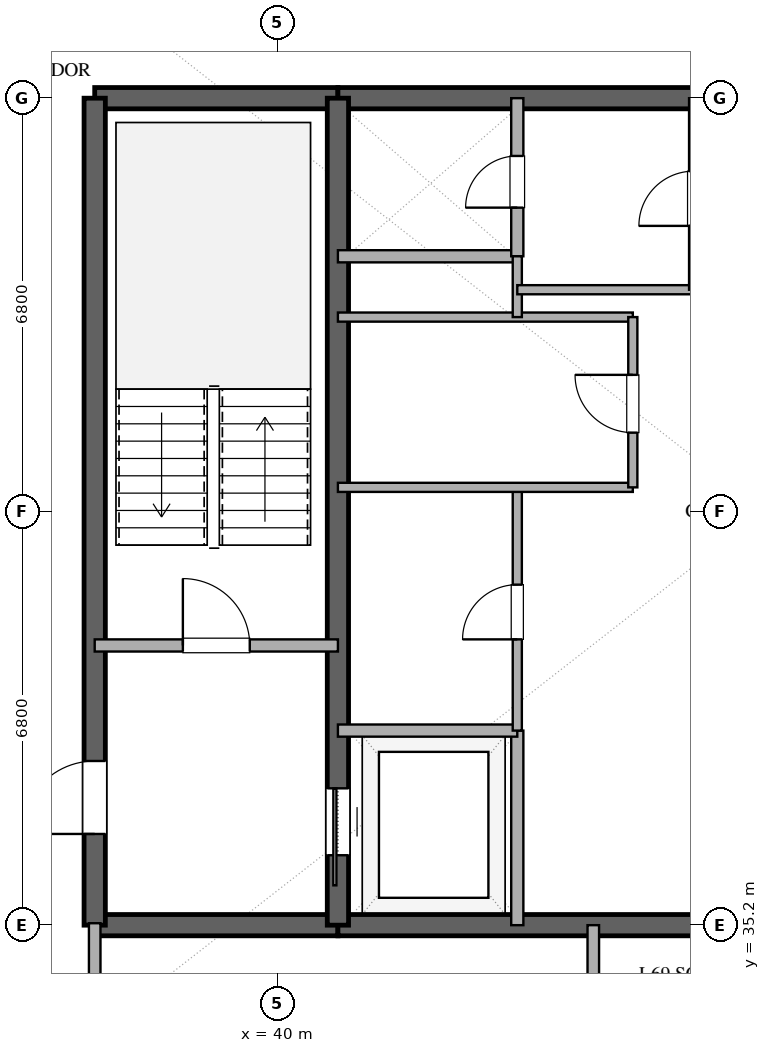
"""IFC4 building model, lengths in metres.
Left out: names, types, materials, properties, quantities, classifications, styles, units other than length and angle.
Written with IfcOpenShell. Run it as: python <this file> out.ifc"""

import sys

from ifc_helpers import new_model, si_unit, direction, frame, frame_2d, origin, place, context, subcontext, project, spatial, rectangle, extrude, element, fill, save


model = new_model("IFC4")
c1 = context("Model", 3, precision=1e-05, world=origin(), true_north=direction((0.0, 1.0)))
c2 = subcontext(c1, "Body", "Model", "MODEL_VIEW")
j1 = project(units=[si_unit("LENGTHUNIT", "METRE"), si_unit("PLANEANGLEUNIT", "RADIAN")], contexts=[c1])
p1 = place(None, origin())
s1 = spatial("IfcSite", under=j1, at=p1, CompositionType="ELEMENT")
p2 = place(p1, origin())
s2 = spatial("IfcBuilding", under=s1, at=p2, CompositionType="ELEMENT")
p3 = place(p2, frame((0.0, 0.0, 269.4)))
s3 = spatial("IfcBuildingStorey", under=s2, at=p3, CompositionType="ELEMENT", Elevation=269.4)
p4 = place(p3, frame((37.0, 35.2, 0.0), z_axis=(0.0, 0.0, 1.0), x_axis=(1.0, 0.0, 0.0)))
e1 = element("IfcWall", 1, at=p4, inside=s3, PredefinedType="SHEAR", context=c2, shape_type="SweptSolid", body=[
    extrude(rectangle(XDim=4.0, YDim=0.35, at=frame_2d((2.0, 0.0))), origin(), (0.0, 0.0, 1.0), 3.37),
])
p5 = place(p3, frame((41.0, 35.2, 0.0), z_axis=(0.0, 0.0, 1.0), x_axis=(1.0, 0.0, 0.0)))
e2 = element("IfcWall", 2, at=p5, inside=s3, PredefinedType="SHEAR", context=c2, shape_type="SweptSolid", body=[
    extrude(rectangle(XDim=14.0, YDim=0.35, at=frame_2d((7.0, 0.0))), origin(), (0.0, 0.0, 1.0), 3.37),
])
p6 = place(p5, frame((6.1, 0.0, 0.0)))
e3 = element("IfcOpeningElement", 3, at=p6, cuts=e2, PredefinedType="OPENING", context=c2, shape_type="SweptSolid", body=[
    extrude(rectangle(XDim=1.8, YDim=2.25, at=frame_2d((0.9, 1.125))), frame((0.0, 0.185, 0.0), z_axis=(0.0, -1.0, 0.0), x_axis=(1.0, 0.0, 0.0)), (0.0, 0.0, 1.0), 0.37),
])
p7 = place(p3, frame((37.0, 48.8, 0.0), z_axis=(0.0, 0.0, 1.0), x_axis=(1.0, 0.0, 0.0)))
e4 = element("IfcWall", 4, at=p7, inside=s3, PredefinedType="SHEAR", context=c2, shape_type="SweptSolid", body=[
    extrude(rectangle(XDim=4.0, YDim=0.35, at=frame_2d((2.0, 0.0))), origin(), (0.0, 0.0, 1.0), 3.37),
])
p8 = place(p3, frame((41.0, 48.8, 0.0), z_axis=(0.0, 0.0, 1.0), x_axis=(1.0, 0.0, 0.0)))
e5 = element("IfcWall", 5, at=p8, inside=s3, PredefinedType="SHEAR", context=c2, shape_type="SweptSolid", body=[
    extrude(rectangle(XDim=14.0, YDim=0.35, at=frame_2d((7.0, 0.0))), origin(), (0.0, 0.0, 1.0), 3.37),
])
p9 = place(p8, frame((6.1, 0.0, 0.0)))
e6 = element("IfcOpeningElement", 6, at=p9, cuts=e5, PredefinedType="OPENING", context=c2, shape_type="SweptSolid", body=[
    extrude(rectangle(XDim=1.8, YDim=2.25, at=frame_2d((0.9, 1.125))), frame((0.0, 0.185, 0.0), z_axis=(0.0, -1.0, 0.0), x_axis=(1.0, 0.0, 0.0)), (0.0, 0.0, 1.0), 0.37),
])
p10 = place(p3, frame((37.0, 35.2, 0.0), z_axis=(0.0, 0.0, 1.0), x_axis=(0.0, 1.0, 0.0)))
e7 = element("IfcWall", 7, at=p10, inside=s3, PredefinedType="SHEAR", context=c2, shape_type="SweptSolid", body=[
    extrude(rectangle(XDim=13.6, YDim=0.35, at=frame_2d((6.8, 0.0))), origin(), (0.0, 0.0, 1.0), 3.37),
])
p11 = place(p10, frame((1.5, 0.0, 0.0)))
e8 = element("IfcOpeningElement", 8, at=p11, cuts=e7, PredefinedType="OPENING", context=c2, shape_type="SweptSolid", body=[
    extrude(rectangle(XDim=1.2, YDim=2.15, at=frame_2d((0.6, 1.075))), frame((0.0, 0.185, 0.0), z_axis=(0.0, -1.0, 0.0), x_axis=(1.0, 0.0, 0.0)), (0.0, 0.0, 1.0), 0.37),
])
p12 = place(p3, frame((41.0, 35.2, 0.0), z_axis=(0.0, 0.0, 1.0), x_axis=(0.0, 1.0, 0.0)))
e9 = element("IfcWall", 9, at=p12, inside=s3, PredefinedType="SHEAR", context=c2, shape_type="SweptSolid", body=[
    extrude(rectangle(XDim=13.6, YDim=0.35, at=frame_2d((6.8, 0.0))), origin(), (0.0, 0.0, 1.0), 3.37),
])
p13 = place(p12, frame((1.15, 0.0, 0.0)))
e10 = element("IfcOpeningElement", 10, at=p13, cuts=e9, PredefinedType="OPENING", context=c2, shape_type="SweptSolid", body=[
    extrude(rectangle(XDim=1.1, YDim=2.2, at=frame_2d((0.55, 1.1))), frame((0.0, 0.185, 0.0), z_axis=(0.0, -1.0, 0.0), x_axis=(1.0, 0.0, 0.0)), (0.0, 0.0, 1.0), 0.37),
])
p14 = place(p3, frame((37.0, 39.8, 0.0), z_axis=(0.0, 0.0, 1.0), x_axis=(1.0, 0.0, 0.0)))
e11 = element("IfcWall", 11, at=p14, inside=s3, PredefinedType="SOLIDWALL", context=c2, shape_type="SweptSolid", body=[
    extrude(rectangle(XDim=4.0, YDim=0.2, at=frame_2d((2.0, 0.0))), origin(), (0.0, 0.0, 1.0), 2.73),
])
p15 = place(p14, frame((1.45, 0.0, 0.0)))
e12 = element("IfcOpeningElement", 12, at=p15, cuts=e11, PredefinedType="OPENING", context=c2, shape_type="SweptSolid", body=[
    extrude(rectangle(XDim=1.1, YDim=2.15, at=frame_2d((0.55, 1.075))), frame((0.0, 0.11, 0.0), z_axis=(0.0, -1.0, 0.0), x_axis=(1.0, 0.0, 0.0)), (0.0, 0.0, 1.0), 0.22),
])
p16 = place(p3, frame((43.95, 35.2, 0.0), z_axis=(0.0, 0.0, 1.0), x_axis=(0.0, 1.0, 0.0)))
e13 = element("IfcWall", 13, at=p16, inside=s3, PredefinedType="SOLIDWALL", context=c2, shape_type="SweptSolid", body=[
    extrude(rectangle(XDim=3.2, YDim=0.2, at=frame_2d((1.6, 0.0))), origin(), (0.0, 0.0, 1.0), 2.73),
])
for number, where, z_axis, x_axis in (
    (14, (41.0, 38.4, 0.0), (0.0, 0.0, 1.0), (1.0, 0.0, 0.0)),
    (15, (41.0, 46.2, 0.0), (0.0, 0.0, 1.0), (1.0, 0.0, 0.0)),
):
    element("IfcWall", number, at=place(p3, frame(where, z_axis=z_axis, x_axis=x_axis)), inside=s3, PredefinedType="SOLIDWALL", context=c2, shape_type="SweptSolid", body=[
        extrude(rectangle(XDim=2.95, YDim=0.2, at=frame_2d((1.475, 0.0))), origin(), (0.0, 0.0, 1.0), 2.73),
    ])
p17 = place(p3, frame((43.95, 46.2, 0.0), z_axis=(0.0, 0.0, 1.0), x_axis=(0.0, 1.0, 0.0)))
e16 = element("IfcWall", 16, at=p17, inside=s3, PredefinedType="SOLIDWALL", context=c2, shape_type="SweptSolid", body=[
    extrude(rectangle(XDim=2.6, YDim=0.2, at=frame_2d((1.3, 0.0))), origin(), (0.0, 0.0, 1.0), 2.73),
])
p18 = place(p17, frame((0.8, 0.0, 0.0)))
e17 = element("IfcOpeningElement", 17, at=p18, cuts=e16, PredefinedType="OPENING", context=c2, shape_type="SweptSolid", body=[
    extrude(rectangle(XDim=0.85, YDim=2.15, at=frame_2d((0.425, 1.075))), frame((0.0, 0.11, 0.0), z_axis=(0.0, -1.0, 0.0), x_axis=(1.0, 0.0, 0.0)), (0.0, 0.0, 1.0), 0.22),
])
p19 = place(p3, frame((43.95, 38.4, 0.0), z_axis=(0.0, 0.0, 1.0), x_axis=(0.0, 1.0, 0.0)))
e18 = element("IfcWall", 18, at=p19, inside=s3, PredefinedType="PARTITIONING", context=c2, shape_type="SweptSolid", body=[
    extrude(rectangle(XDim=4.0, YDim=0.15, at=frame_2d((2.0, 0.0))), origin(), (0.0, 0.0, 1.0), 2.73),
])
p20 = place(p19, frame((1.5, 0.0, 0.0)))
e19 = element("IfcOpeningElement", 19, at=p20, cuts=e18, PredefinedType="OPENING", context=c2, shape_type="SweptSolid", body=[
    extrude(rectangle(XDim=0.9, YDim=2.15, at=frame_2d((0.45, 1.075))), frame((0.0, 0.085, 0.0), z_axis=(0.0, -1.0, 0.0), x_axis=(1.0, 0.0, 0.0)), (0.0, 0.0, 1.0), 0.17),
])
for number, where, z_axis, x_axis in (
    (20, (41.0, 42.4, 0.0), (0.0, 0.0, 1.0), (1.0, 0.0, 0.0)),
    (21, (41.0, 45.2, 0.0), (0.0, 0.0, 1.0), (1.0, 0.0, 0.0)),
):
    element("IfcWall", number, at=place(p3, frame(where, z_axis=z_axis, x_axis=x_axis)), inside=s3, PredefinedType="PARTITIONING", context=c2, shape_type="SweptSolid", body=[
        extrude(rectangle(XDim=4.85, YDim=0.15, at=frame_2d((2.425, 0.0))), origin(), (0.0, 0.0, 1.0), 2.73),
    ])
p21 = place(p3, frame((43.95, 45.2, 0.0), z_axis=(0.0, 0.0, 1.0), x_axis=(0.0, 1.0, 0.0)))
e22 = element("IfcWall", 22, at=p21, inside=s3, PredefinedType="PARTITIONING", context=c2, shape_type="SweptSolid", body=[
    extrude(rectangle(XDim=1.0, YDim=0.15, at=frame_2d((0.5, 0.0))), origin(), (0.0, 0.0, 1.0), 2.73),
])
p22 = place(p3, frame((45.85, 42.4, 0.0), z_axis=(0.0, 0.0, 1.0), x_axis=(0.0, 1.0, 0.0)))
e23 = element("IfcWall", 23, at=p22, inside=s3, PredefinedType="PARTITIONING", context=c2, shape_type="SweptSolid", body=[
    extrude(rectangle(XDim=2.8, YDim=0.15, at=frame_2d((1.4, 0.0))), origin(), (0.0, 0.0, 1.0), 2.73),
])
p23 = place(p22, frame((0.9, 0.0, 0.0)))
e24 = element("IfcOpeningElement", 24, at=p23, cuts=e23, PredefinedType="OPENING", context=c2, shape_type="SweptSolid", body=[
    extrude(rectangle(XDim=0.95, YDim=2.15, at=frame_2d((0.475, 1.075))), frame((0.0, 0.085, 0.0), z_axis=(0.0, -1.0, 0.0), x_axis=(1.0, 0.0, 0.0)), (0.0, 0.0, 1.0), 0.17),
])
p24 = place(p3, frame((43.95, 45.65, 0.0), z_axis=(0.0, 0.0, 1.0), x_axis=(1.0, 0.0, 0.0)))
e25 = element("IfcWall", 25, at=p24, inside=s3, PredefinedType="PARTITIONING", context=c2, shape_type="SweptSolid", body=[
    extrude(rectangle(XDim=2.9, YDim=0.15, at=frame_2d((1.45, 0.0))), origin(), (0.0, 0.0, 1.0), 2.73),
])
p25 = place(p3, frame((46.85, 45.65, 0.0), z_axis=(0.0, 0.0, 1.0), x_axis=(0.0, 1.0, 0.0)))
e26 = element("IfcWall", 26, at=p25, inside=s3, PredefinedType="PARTITIONING", context=c2, shape_type="SweptSolid", body=[
    extrude(rectangle(XDim=3.15, YDim=0.15, at=frame_2d((1.575, 0.0))), origin(), (0.0, 0.0, 1.0), 2.73),
])
p26 = place(p25, frame((1.05, 0.0, 0.0)))
e27 = element("IfcOpeningElement", 27, at=p26, cuts=e26, PredefinedType="OPENING", context=c2, shape_type="SweptSolid", body=[
    extrude(rectangle(XDim=0.9, YDim=2.15, at=frame_2d((0.45, 1.075))), frame((0.0, 0.085, 0.0), z_axis=(0.0, -1.0, 0.0), x_axis=(1.0, 0.0, 0.0)), (0.0, 0.0, 1.0), 0.17),
])
p27 = place(p3, frame((45.2, 35.2, 0.0), z_axis=(0.0, 0.0, 1.0), x_axis=(0.0, -1.0, 0.0)))
e28 = element("IfcWall", 28, at=p27, inside=s3, PredefinedType="PARTITIONING", context=c2, shape_type="SweptSolid", body=[
    extrude(rectangle(XDim=2.1, YDim=0.19, at=frame_2d((1.05, 0.0))), origin(), (0.0, 0.0, 1.0), 2.73),
])
p28 = place(p3, frame((37.0, 35.232, 0.0), z_axis=(0.0, 0.0, 1.0), x_axis=(0.0, -1.0, 0.0)))
e29 = element("IfcWall", 29, at=p28, inside=s3, PredefinedType="PARTITIONING", context=c2, shape_type="SweptSolid", body=[
    extrude(rectangle(XDim=1.232, YDim=0.19, at=frame_2d((0.616, 0.0))), origin(), (0.0, 0.0, 1.0), 2.73),
])
p29 = place(p13, origin())
e30 = element("IfcDoor", 30, at=p29, inside=s3, OperationType="SLIDING_TO_LEFT", PredefinedType="DOOR", context=c2, shape_type="SweptSolid", body=[
    extrude(rectangle(XDim=1.1, YDim=2.2, at=frame_2d((0.55, 1.1))), frame((0.0, 0.025, 0.0), z_axis=(0.0, -1.0, 0.0), x_axis=(1.0, 0.0, 0.0)), (0.0, 0.0, 1.0), 0.05),
])
fill(e10, e30)
p30 = place(p11, origin())
e31 = element("IfcDoor", 31, at=p30, inside=s3, OperationType="SINGLE_SWING_LEFT", PredefinedType="DOOR", context=c2, shape_type="SweptSolid", body=[
    extrude(rectangle(XDim=1.2, YDim=2.15, at=frame_2d((0.6, 1.075))), frame((0.0, 0.025, 0.0), z_axis=(0.0, -1.0, 0.0), x_axis=(1.0, 0.0, 0.0)), (0.0, 0.0, 1.0), 0.05),
])
fill(e8, e31)
p31 = place(p15, origin())
e32 = element("IfcDoor", 32, at=p31, inside=s3, OperationType="SINGLE_SWING_LEFT", PredefinedType="DOOR", context=c2, shape_type="SweptSolid", body=[
    extrude(rectangle(XDim=1.1, YDim=2.15, at=frame_2d((0.55, 1.075))), frame((0.0, 0.025, 0.0), z_axis=(0.0, -1.0, 0.0), x_axis=(1.0, 0.0, 0.0)), (0.0, 0.0, 1.0), 0.05),
])
fill(e12, e32)
p32 = place(p18, origin())
e33 = element("IfcDoor", 33, at=p32, inside=s3, OperationType="SINGLE_SWING_LEFT", PredefinedType="DOOR", context=c2, shape_type="SweptSolid", body=[
    extrude(rectangle(XDim=0.85, YDim=2.15, at=frame_2d((0.425, 1.075))), frame((0.0, 0.025, 0.0), z_axis=(0.0, -1.0, 0.0), x_axis=(1.0, 0.0, 0.0)), (0.0, 0.0, 1.0), 0.05),
])
fill(e17, e33)
p33 = place(p20, origin())
e34 = element("IfcDoor", 34, at=p33, inside=s3, OperationType="SINGLE_SWING_LEFT", PredefinedType="DOOR", context=c2, shape_type="SweptSolid", body=[
    extrude(rectangle(XDim=0.9, YDim=2.15, at=frame_2d((0.45, 1.075))), frame((0.0, 0.025, 0.0), z_axis=(0.0, -1.0, 0.0), x_axis=(1.0, 0.0, 0.0)), (0.0, 0.0, 1.0), 0.05),
])
fill(e19, e34)
p34 = place(p23, origin())
e35 = element("IfcDoor", 35, at=p34, inside=s3, OperationType="SINGLE_SWING_RIGHT", PredefinedType="DOOR", context=c2, shape_type="SweptSolid", body=[
    extrude(rectangle(XDim=0.95, YDim=2.15, at=frame_2d((0.475, 1.075))), frame((0.0, 0.025, 0.0), z_axis=(0.0, -1.0, 0.0), x_axis=(1.0, 0.0, 0.0)), (0.0, 0.0, 1.0), 0.05),
])
fill(e24, e35)
save(model, sys.argv[1])
